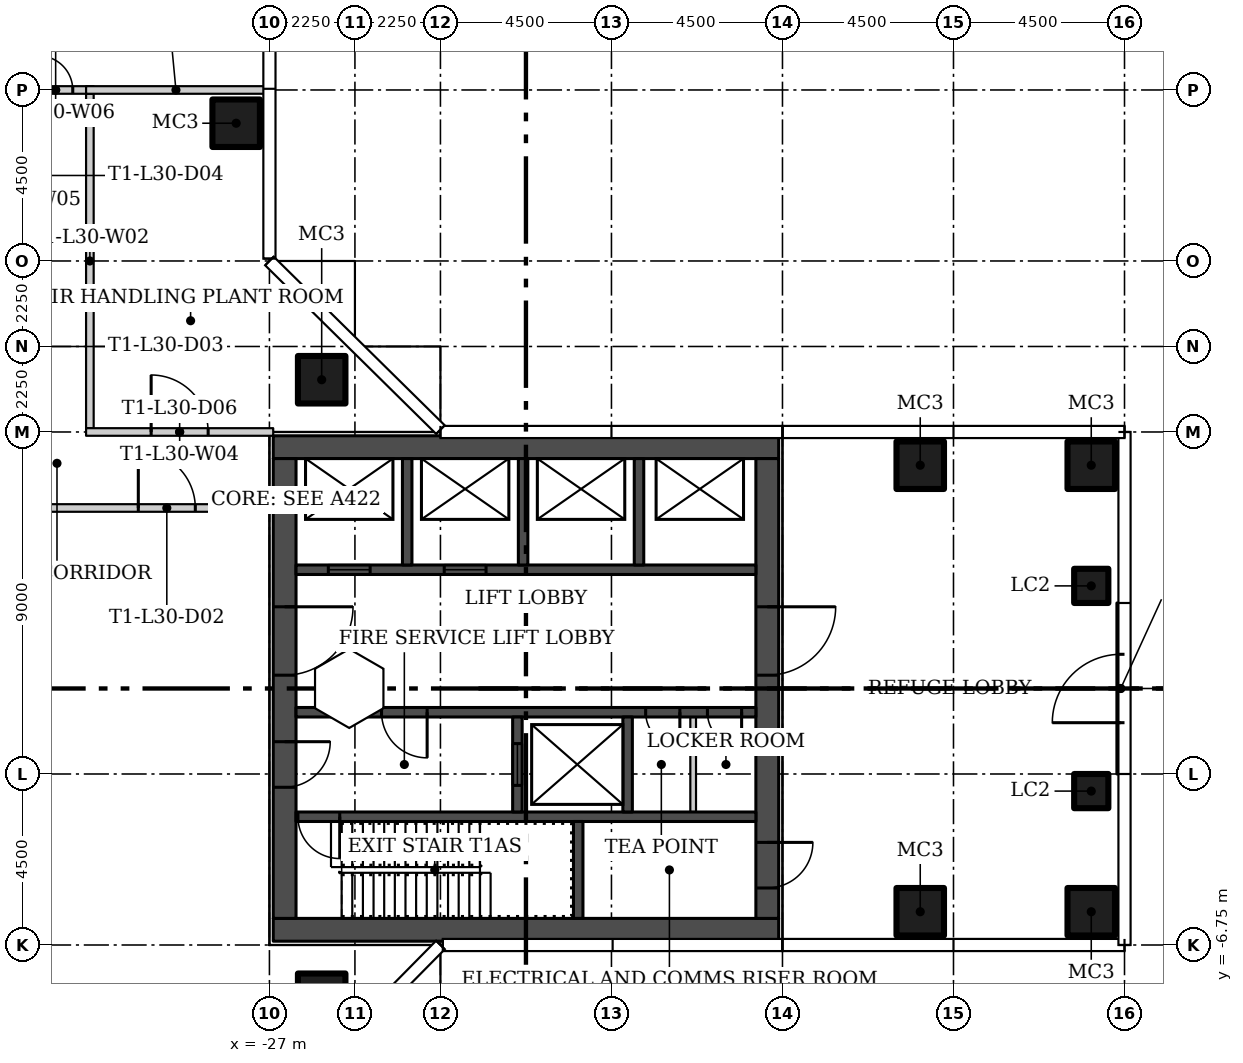
"""IFC4 building model, lengths in metres.
Left out: names, types, materials, properties, quantities, classifications, styles, units other than length and angle.
Written with IfcOpenShell. Run it as: python <this file> out.ifc"""

import sys

from ifc_helpers import new_model, si_unit, direction, frame, frame_2d, origin, origin_2d, place, context, subcontext, project, spatial, rectangle, hollow_rectangle, extrude, element, fill, save


model = new_model("IFC4")
c1 = context("Model", 3, precision=1e-05, world=origin(), true_north=direction((0.0, 1.0)))
c2 = subcontext(c1, "Body", "Model", "MODEL_VIEW")
j1 = project(units=[si_unit("LENGTHUNIT", "METRE"), si_unit("PLANEANGLEUNIT", "RADIAN")], contexts=[c1])
p1 = place(None, origin())
s1 = spatial("IfcSite", under=j1, at=p1, CompositionType="ELEMENT")
p2 = place(p1, origin())
s2 = spatial("IfcBuilding", under=s1, at=p2, CompositionType="ELEMENT")
p3 = place(p2, frame((0.0, 0.0, 128.7)))
s3 = spatial("IfcBuildingStorey", under=s2, at=p3, CompositionType="ELEMENT", Elevation=128.7)
for number, where in (
    (1, (-25.625, 8.125, 0.0)),
    (2, (-25.625, -8.125, 0.0)),
    (3, (-9.875, -5.875, 0.0)),
    (4, (-5.375, -5.875, 0.0)),
    (5, (-9.875, 5.875, 0.0)),
    (6, (-5.375, 5.875, 0.0)),
    (7, (-27.875, 14.875, 0.0)),
):
    element("IfcColumn", number, at=place(p3, frame(where)), inside=s3, PredefinedType="COLUMN", context=c2, shape_type="SweptSolid", body=[
        extrude(hollow_rectangle(XDim=1.25, YDim=1.25, WallThickness=0.05, at=origin_2d()), origin(), (0.0, 0.0, 1.0), 4.4),
    ])
for number, where in (
    (8, (-5.375, -2.7, 0.0)),
    (9, (-5.375, 2.7, 0.0)),
):
    element("IfcColumn", number, at=place(p3, frame(where)), inside=s3, PredefinedType="COLUMN", context=c2, shape_type="SweptSolid", body=[
        extrude(hollow_rectangle(XDim=0.9, YDim=0.9, WallThickness=0.036, at=origin_2d()), origin(), (0.0, 0.0, 1.0), 4.4),
    ])
p4 = place(p3, frame((-40.6, 4.75, 0.0)))
e10 = element("IfcWall", 10, at=p4, inside=s3, PredefinedType="PARTITIONING", context=c2, shape_type="SweptSolid", body=[
    extrude(rectangle(XDim=13.7, YDim=0.2, at=frame_2d((6.85, 0.0))), origin(), (0.0, 0.0, 1.0), 4.4),
])
p5 = place(p4, frame((2.05, 0.0, 0.0)))
e11 = element("IfcOpeningElement", 11, at=p5, cuts=e10, PredefinedType="OPENING", context=c2, shape_type="SweptSolid", body=[
    extrude(rectangle(XDim=1.5, YDim=2.4, at=frame_2d((0.75, 1.2))), frame((0.0, 0.11, 0.0), z_axis=(0.0, -1.0, 0.0), x_axis=(1.0, 0.0, 0.0)), (0.0, 0.0, 1.0), 0.22),
])
p6 = place(p4, frame((10.15, 0.0, 0.0)))
e12 = element("IfcOpeningElement", 12, at=p6, cuts=e10, PredefinedType="OPENING", context=c2, shape_type="SweptSolid", body=[
    extrude(rectangle(XDim=1.5, YDim=2.4, at=frame_2d((0.75, 1.2))), frame((0.0, 0.11, 0.0), z_axis=(0.0, -1.0, 0.0), x_axis=(1.0, 0.0, 0.0)), (0.0, 0.0, 1.0), 0.22),
])
p7 = place(p3, frame((-31.725, 15.65, 0.0), z_axis=(0.0, 0.0, 1.0), x_axis=(0.0, -1.0, 0.0)))
e13 = element("IfcWall", 13, at=p7, inside=s3, PredefinedType="PARTITIONING", context=c2, shape_type="SweptSolid", body=[
    extrude(rectangle(XDim=8.8, YDim=0.2, at=frame_2d((4.4, 0.0))), origin(), (0.0, 0.0, 1.0), 4.4),
])
p8 = place(p3, frame((-31.825, 6.75, 0.0)))
e14 = element("IfcWall", 14, at=p8, inside=s3, PredefinedType="PARTITIONING", context=c2, shape_type="SweptSolid", body=[
    extrude(rectangle(XDim=4.925, YDim=0.2, at=frame_2d((2.462, 0.0))), origin(), (0.0, 0.0, 1.0), 4.4),
])
p9 = place(p8, frame((1.712, 0.0, 0.0)))
e15 = element("IfcOpeningElement", 15, at=p9, cuts=e14, PredefinedType="OPENING", context=c2, shape_type="SweptSolid", body=[
    extrude(rectangle(XDim=1.5, YDim=2.4, at=frame_2d((0.75, 1.2))), frame((0.0, 0.11, 0.0), z_axis=(0.0, -1.0, 0.0), x_axis=(1.0, 0.0, 0.0)), (0.0, 0.0, 1.0), 0.22),
])
p10 = place(p3, frame((-33.625, 15.75, 0.0)))
e16 = element("IfcWall", 16, at=p10, inside=s3, PredefinedType="PARTITIONING", context=c2, shape_type="SweptSolid", body=[
    extrude(rectangle(XDim=2.001, YDim=0.2, at=frame_2d((1.0, 0.0))), origin(), (0.0, 0.0, 1.0), 4.4),
])
p11 = place(p10, frame((0.55, 0.0, 0.0)))
e17 = element("IfcOpeningElement", 17, at=p11, cuts=e16, PredefinedType="OPENING", context=c2, shape_type="SweptSolid", body=[
    extrude(rectangle(XDim=0.9, YDim=2.4, at=frame_2d((0.45, 1.2))), frame((0.0, 0.11, 0.0), z_axis=(0.0, -1.0, 0.0), x_axis=(1.0, 0.0, 0.0)), (0.0, 0.0, 1.0), 0.22),
])
p12 = place(p3, frame((-27.095, 15.75, 0.0), z_axis=(0.0, 0.0, 1.0), x_axis=(-1.0, 0.0, 0.0)))
e18 = element("IfcWall", 18, at=p12, inside=s3, PredefinedType="PARTITIONING", context=c2, shape_type="SweptSolid", body=[
    extrude(rectangle(XDim=4.73, YDim=0.2, at=frame_2d((2.365, 0.0))), origin(), (0.0, 0.0, 1.0), 4.4),
])
p13 = place(p3, frame((-4.6, -2.25, 0.0), z_axis=(0.0, 0.0, 1.0), x_axis=(0.0, 1.0, 0.0)))
e19 = element("IfcWall", 19, at=p13, inside=s3, PredefinedType="PARTITIONING", context=c2, shape_type="SweptSolid", body=[
    extrude(rectangle(XDim=4.5, YDim=0.2, at=frame_2d((2.25, 0.0))), origin(), (0.0, 0.0, 1.0), 4.4),
])
p14 = place(p13, frame((1.35, 0.0, 0.0)))
e20 = element("IfcOpeningElement", 20, at=p14, cuts=e19, PredefinedType="OPENING", context=c2, shape_type="SweptSolid", body=[
    extrude(rectangle(XDim=1.8, YDim=2.1, at=frame_2d((0.9, 1.05))), frame((0.0, 0.11, 0.0), z_axis=(0.0, -1.0, 0.0), x_axis=(1.0, 0.0, 0.0)), (0.0, 0.0, 1.0), 0.22),
])
for number, where in (
    (21, (-26.9, -6.35, 0.0)),
    (22, (-26.9, 6.35, 0.0)),
):
    element("IfcWall", number, at=place(p3, frame(where)), inside=s3, PredefinedType="SHEAR", context=c2, shape_type="SweptSolid", body=[
        extrude(rectangle(XDim=13.3, YDim=0.6, at=frame_2d((6.65, 0.0))), origin(), (0.0, 0.0, 1.0), 4.4),
    ])
p15 = place(p3, frame((-26.6, 6.05, 0.0), z_axis=(0.0, 0.0, 1.0), x_axis=(0.0, -1.0, 0.0)))
e23 = element("IfcWall", 23, at=p15, inside=s3, PredefinedType="SHEAR", context=c2, shape_type="SweptSolid", body=[
    extrude(rectangle(XDim=12.1, YDim=0.6, at=frame_2d((6.05, 0.0))), origin(), (0.0, 0.0, 1.0), 4.4),
])
p16 = place(p15, frame((7.45, 0.0, 0.0)))
e24 = element("IfcOpeningElement", 24, at=p16, cuts=e23, PredefinedType="OPENING", context=c2, shape_type="SweptSolid", body=[
    extrude(rectangle(XDim=1.2, YDim=2.1, at=frame_2d((0.6, 1.05))), frame((0.0, 0.31, 0.0), z_axis=(0.0, -1.0, 0.0), x_axis=(1.0, 0.0, 0.0)), (0.0, 0.0, 1.0), 0.62),
])
p17 = place(p15, frame((3.9, 0.0, 0.0)))
e25 = element("IfcOpeningElement", 25, at=p17, cuts=e23, PredefinedType="OPENING", context=c2, shape_type="SweptSolid", body=[
    extrude(rectangle(XDim=1.8, YDim=2.4, at=frame_2d((0.9, 1.2))), frame((0.0, 0.31, 0.0), z_axis=(0.0, -1.0, 0.0), x_axis=(1.0, 0.0, 0.0)), (0.0, 0.0, 1.0), 0.62),
])
p18 = place(p3, frame((-13.9, 6.05, 0.0), z_axis=(0.0, 0.0, 1.0), x_axis=(0.0, -1.0, 0.0)))
e26 = element("IfcWall", 26, at=p18, inside=s3, PredefinedType="SHEAR", context=c2, shape_type="SweptSolid", body=[
    extrude(rectangle(XDim=12.1, YDim=0.6, at=frame_2d((6.05, 0.0))), origin(), (0.0, 0.0, 1.0), 4.4),
])
p19 = place(p18, frame((10.1, 0.0, 0.0)))
e27 = element("IfcOpeningElement", 27, at=p19, cuts=e26, PredefinedType="OPENING", context=c2, shape_type="SweptSolid", body=[
    extrude(rectangle(XDim=1.2, YDim=2.1, at=frame_2d((0.6, 1.05))), frame((0.0, 0.31, 0.0), z_axis=(0.0, -1.0, 0.0), x_axis=(1.0, 0.0, 0.0)), (0.0, 0.0, 1.0), 0.62),
])
p20 = place(p18, frame((3.9, 0.0, 0.0)))
e28 = element("IfcOpeningElement", 28, at=p20, cuts=e26, PredefinedType="OPENING", context=c2, shape_type="SweptSolid", body=[
    extrude(rectangle(XDim=1.8, YDim=2.4, at=frame_2d((0.9, 1.2))), frame((0.0, 0.31, 0.0), z_axis=(0.0, -1.0, 0.0), x_axis=(1.0, 0.0, 0.0)), (0.0, 0.0, 1.0), 0.62),
])
p21 = place(p3, frame((-14.2, -3.375, 0.0), z_axis=(0.0, 0.0, 1.0), x_axis=(-1.0, 0.0, 0.0)))
e29 = element("IfcWall", 29, at=p21, inside=s3, PredefinedType="SHEAR", context=c2, shape_type="SweptSolid", body=[
    extrude(rectangle(XDim=12.1, YDim=0.25, at=frame_2d((6.05, 0.0))), origin(), (0.0, 0.0, 1.0), 4.4),
])
p22 = place(p21, frame((10.95, 0.0, 0.0)))
e30 = element("IfcOpeningElement", 30, at=p22, cuts=e29, PredefinedType="OPENING", context=c2, shape_type="SweptSolid", body=[
    extrude(rectangle(XDim=1.1, YDim=2.1, at=frame_2d((0.55, 1.05))), frame((0.0, 0.135, 0.0), z_axis=(0.0, -1.0, 0.0), x_axis=(1.0, 0.0, 0.0)), (0.0, 0.0, 1.0), 0.27),
])
p23 = place(p3, frame((-18.875, -6.05, 0.0), z_axis=(0.0, 0.0, 1.0), x_axis=(0.0, 1.0, 0.0)))
e31 = element("IfcWall", 31, at=p23, inside=s3, PredefinedType="SHEAR", context=c2, shape_type="SweptSolid", body=[
    extrude(rectangle(XDim=2.55, YDim=0.25, at=frame_2d((1.275, 0.0))), origin(), (0.0, 0.0, 1.0), 4.4),
])
p24 = place(p3, frame((-14.2, -0.625, 0.0), z_axis=(0.0, 0.0, 1.0), x_axis=(-1.0, 0.0, 0.0)))
e32 = element("IfcWall", 32, at=p24, inside=s3, PredefinedType="SHEAR", context=c2, shape_type="SweptSolid", body=[
    extrude(rectangle(XDim=12.1, YDim=0.25, at=frame_2d((6.05, 0.0))), origin(), (0.0, 0.0, 1.0), 4.4),
])
p25 = place(p24, frame((8.65, 0.0, 0.0)))
e33 = element("IfcOpeningElement", 33, at=p25, cuts=e32, PredefinedType="OPENING", context=c2, shape_type="SweptSolid", body=[
    extrude(rectangle(XDim=1.2, YDim=2.1, at=frame_2d((0.6, 1.05))), frame((0.0, 0.135, 0.0), z_axis=(0.0, -1.0, 0.0), x_axis=(1.0, 0.0, 0.0)), (0.0, 0.0, 1.0), 0.27),
])
p26 = place(p24, frame((2.0, 0.0, 0.0)))
e34 = element("IfcOpeningElement", 34, at=p26, cuts=e32, PredefinedType="OPENING", context=c2, shape_type="SweptSolid", body=[
    extrude(rectangle(XDim=0.9, YDim=2.1, at=frame_2d((0.45, 1.05))), frame((0.0, 0.135, 0.0), z_axis=(0.0, -1.0, 0.0), x_axis=(1.0, 0.0, 0.0)), (0.0, 0.0, 1.0), 0.27),
])
p27 = place(p24, frame((0.375, 0.0, 0.0)))
e35 = element("IfcOpeningElement", 35, at=p27, cuts=e32, PredefinedType="OPENING", context=c2, shape_type="SweptSolid", body=[
    extrude(rectangle(XDim=0.9, YDim=2.1, at=frame_2d((0.45, 1.05))), frame((0.0, 0.135, 0.0), z_axis=(0.0, -1.0, 0.0), x_axis=(1.0, 0.0, 0.0)), (0.0, 0.0, 1.0), 0.27),
])
p28 = place(p3, frame((-20.475, -3.25, 0.0), z_axis=(0.0, 0.0, 1.0), x_axis=(0.0, 1.0, 0.0)))
e36 = element("IfcWall", 36, at=p28, inside=s3, PredefinedType="SHEAR", context=c2, shape_type="SweptSolid", body=[
    extrude(rectangle(XDim=2.5, YDim=0.25, at=frame_2d((1.25, 0.0))), origin(), (0.0, 0.0, 1.0), 4.4),
])
p29 = place(p28, frame((0.7, 0.0, 0.0)))
e37 = element("IfcOpeningElement", 37, at=p29, cuts=e36, PredefinedType="OPENING", context=c2, shape_type="SweptSolid", body=[
    extrude(rectangle(XDim=1.1, YDim=2.1, at=frame_2d((0.55, 1.05))), frame((0.0, 0.135, 0.0), z_axis=(0.0, -1.0, 0.0), x_axis=(1.0, 0.0, 0.0)), (0.0, 0.0, 1.0), 0.27),
])
p30 = place(p3, frame((-17.575, -3.25, 0.0), z_axis=(0.0, 0.0, 1.0), x_axis=(0.0, 1.0, 0.0)))
e38 = element("IfcWall", 38, at=p30, inside=s3, PredefinedType="SHEAR", context=c2, shape_type="SweptSolid", body=[
    extrude(rectangle(XDim=2.5, YDim=0.25, at=frame_2d((1.25, 0.0))), origin(), (0.0, 0.0, 1.0), 4.4),
])
p31 = place(p3, frame((-15.85, -3.25, 0.0), z_axis=(0.0, 0.0, 1.0), x_axis=(0.0, 1.0, 0.0)))
e39 = element("IfcWall", 39, at=p31, inside=s3, PredefinedType="PARTITIONING", context=c2, shape_type="SweptSolid", body=[
    extrude(rectangle(XDim=2.5, YDim=0.15, at=frame_2d((1.25, 0.0))), origin(), (0.0, 0.0, 1.0), 4.4),
])
p32 = place(p3, frame((-26.3, 3.125, 0.0)))
e40 = element("IfcWall", 40, at=p32, inside=s3, PredefinedType="SHEAR", context=c2, shape_type="SweptSolid", body=[
    extrude(rectangle(XDim=12.1, YDim=0.25, at=frame_2d((6.05, 0.0))), origin(), (0.0, 0.0, 1.0), 4.4),
])
p33 = place(p32, frame((0.85, 0.0, 0.0)))
e41 = element("IfcOpeningElement", 41, at=p33, cuts=e40, PredefinedType="OPENING", context=c2, shape_type="SweptSolid", body=[
    extrude(rectangle(XDim=1.1, YDim=2.1, at=frame_2d((0.55, 1.05))), frame((0.0, 0.135, 0.0), z_axis=(0.0, -1.0, 0.0), x_axis=(1.0, 0.0, 0.0)), (0.0, 0.0, 1.0), 0.27),
])
p34 = place(p32, frame((3.9, 0.0, 0.0)))
e42 = element("IfcOpeningElement", 42, at=p34, cuts=e40, PredefinedType="OPENING", context=c2, shape_type="SweptSolid", body=[
    extrude(rectangle(XDim=1.1, YDim=2.1, at=frame_2d((0.55, 1.05))), frame((0.0, 0.135, 0.0), z_axis=(0.0, -1.0, 0.0), x_axis=(1.0, 0.0, 0.0)), (0.0, 0.0, 1.0), 0.27),
])
for number, where, z_axis, x_axis in (
    (43, (-23.375, 3.25, 0.0), (0.0, 0.0, 1.0), (0.0, 1.0, 0.0)),
    (44, (-20.325, 3.25, 0.0), (0.0, 0.0, 1.0), (0.0, 1.0, 0.0)),
    (45, (-17.275, 3.25, 0.0), (0.0, 0.0, 1.0), (0.0, 1.0, 0.0)),
):
    element("IfcWall", number, at=place(p3, frame(where, z_axis=z_axis, x_axis=x_axis)), inside=s3, PredefinedType="SHEAR", context=c2, shape_type="SweptSolid", body=[
        extrude(rectangle(XDim=2.8, YDim=0.25, at=frame_2d((1.4, 0.0))), origin(), (0.0, 0.0, 1.0), 4.4),
    ])
p35 = place(p6, origin())
e46 = element("IfcDoor", 46, at=p35, inside=s3, OperationType="DOUBLE_DOOR_SINGLE_SWING", PredefinedType="DOOR", context=c2, shape_type="SweptSolid", body=[
    extrude(rectangle(XDim=1.5, YDim=2.4, at=frame_2d((0.75, 1.2))), frame((0.0, 0.025, 0.0), z_axis=(0.0, -1.0, 0.0), x_axis=(1.0, 0.0, 0.0)), (0.0, 0.0, 1.0), 0.05),
])
fill(e12, e46)
p36 = place(p11, origin())
e47 = element("IfcDoor", 47, at=p36, inside=s3, OperationType="SINGLE_SWING_RIGHT", PredefinedType="DOOR", context=c2, shape_type="SweptSolid", body=[
    extrude(rectangle(XDim=0.9, YDim=2.4, at=frame_2d((0.45, 1.2))), frame((0.0, 0.025, 0.0), z_axis=(0.0, -1.0, 0.0), x_axis=(1.0, 0.0, 0.0)), (0.0, 0.0, 1.0), 0.05),
])
fill(e17, e47)
p37 = place(p9, origin())
e48 = element("IfcDoor", 48, at=p37, inside=s3, OperationType="DOUBLE_DOOR_SINGLE_SWING", PredefinedType="DOOR", context=c2, shape_type="SweptSolid", body=[
    extrude(rectangle(XDim=1.5, YDim=2.4, at=frame_2d((0.75, 1.2))), frame((0.0, 0.025, 0.0), z_axis=(0.0, -1.0, 0.0), x_axis=(1.0, 0.0, 0.0)), (0.0, 0.0, 1.0), 0.05),
])
fill(e15, e48)
p38 = place(p14, origin())
e49 = element("IfcDoor", 49, at=p38, inside=s3, OperationType="DOUBLE_DOOR_SINGLE_SWING", PredefinedType="DOOR", context=c2, shape_type="SweptSolid", body=[
    extrude(rectangle(XDim=1.8, YDim=2.1, at=frame_2d((0.9, 1.05))), frame((0.0, 0.025, 0.0), z_axis=(0.0, -1.0, 0.0), x_axis=(1.0, 0.0, 0.0)), (0.0, 0.0, 1.0), 0.05),
])
fill(e20, e49)
p39 = place(p16, origin())
e50 = element("IfcDoor", 50, at=p39, inside=s3, OperationType="SINGLE_SWING_RIGHT", PredefinedType="DOOR", context=c2, shape_type="SweptSolid", body=[
    extrude(rectangle(XDim=1.2, YDim=2.1, at=frame_2d((0.6, 1.05))), frame((0.0, 0.025, 0.0), z_axis=(0.0, -1.0, 0.0), x_axis=(1.0, 0.0, 0.0)), (0.0, 0.0, 1.0), 0.05),
])
fill(e24, e50)
p40 = place(p17, origin())
e51 = element("IfcDoor", 51, at=p40, inside=s3, OperationType="DOUBLE_DOOR_SINGLE_SWING", PredefinedType="DOOR", context=c2, shape_type="SweptSolid", body=[
    extrude(rectangle(XDim=1.8, YDim=2.4, at=frame_2d((0.9, 1.2))), frame((0.0, 0.025, 0.0), z_axis=(0.0, -1.0, 0.0), x_axis=(1.0, 0.0, 0.0)), (0.0, 0.0, 1.0), 0.05),
])
fill(e25, e51)
p41 = place(p19, origin())
e52 = element("IfcDoor", 52, at=p41, inside=s3, OperationType="SINGLE_SWING_RIGHT", PredefinedType="DOOR", context=c2, shape_type="SweptSolid", body=[
    extrude(rectangle(XDim=1.2, YDim=2.1, at=frame_2d((0.6, 1.05))), frame((0.0, 0.025, 0.0), z_axis=(0.0, -1.0, 0.0), x_axis=(1.0, 0.0, 0.0)), (0.0, 0.0, 1.0), 0.05),
])
fill(e27, e52)
p42 = place(p20, origin())
e53 = element("IfcDoor", 53, at=p42, inside=s3, OperationType="DOUBLE_DOOR_SINGLE_SWING", PredefinedType="DOOR", context=c2, shape_type="SweptSolid", body=[
    extrude(rectangle(XDim=1.8, YDim=2.4, at=frame_2d((0.9, 1.2))), frame((0.0, 0.025, 0.0), z_axis=(0.0, -1.0, 0.0), x_axis=(1.0, 0.0, 0.0)), (0.0, 0.0, 1.0), 0.05),
])
fill(e28, e53)
p43 = place(p22, origin())
e54 = element("IfcDoor", 54, at=p43, inside=s3, OperationType="SINGLE_SWING_RIGHT", PredefinedType="DOOR", context=c2, shape_type="SweptSolid", body=[
    extrude(rectangle(XDim=1.1, YDim=2.1, at=frame_2d((0.55, 1.05))), frame((0.0, 0.025, 0.0), z_axis=(0.0, -1.0, 0.0), x_axis=(1.0, 0.0, 0.0)), (0.0, 0.0, 1.0), 0.05),
])
fill(e30, e54)
p44 = place(p25, origin())
e55 = element("IfcDoor", 55, at=p44, inside=s3, OperationType="SINGLE_SWING_RIGHT", PredefinedType="DOOR", context=c2, shape_type="SweptSolid", body=[
    extrude(rectangle(XDim=1.2, YDim=2.1, at=frame_2d((0.6, 1.05))), frame((0.0, 0.025, 0.0), z_axis=(0.0, -1.0, 0.0), x_axis=(1.0, 0.0, 0.0)), (0.0, 0.0, 1.0), 0.05),
])
fill(e33, e55)
p45 = place(p26, origin())
e56 = element("IfcDoor", 56, at=p45, inside=s3, OperationType="SINGLE_SWING_LEFT", PredefinedType="DOOR", context=c2, shape_type="SweptSolid", body=[
    extrude(rectangle(XDim=0.9, YDim=2.1, at=frame_2d((0.45, 1.05))), frame((0.0, 0.025, 0.0), z_axis=(0.0, -1.0, 0.0), x_axis=(1.0, 0.0, 0.0)), (0.0, 0.0, 1.0), 0.05),
])
fill(e34, e56)
p46 = place(p27, origin())
e57 = element("IfcDoor", 57, at=p46, inside=s3, OperationType="SINGLE_SWING_LEFT", PredefinedType="DOOR", context=c2, shape_type="SweptSolid", body=[
    extrude(rectangle(XDim=0.9, YDim=2.1, at=frame_2d((0.45, 1.05))), frame((0.0, 0.025, 0.0), z_axis=(0.0, -1.0, 0.0), x_axis=(1.0, 0.0, 0.0)), (0.0, 0.0, 1.0), 0.05),
])
fill(e35, e57)
p47 = place(p29, origin())
e58 = element("IfcDoor", 58, at=p47, inside=s3, OperationType="SLIDING_TO_LEFT", PredefinedType="DOOR", context=c2, shape_type="SweptSolid", body=[
    extrude(rectangle(XDim=1.1, YDim=2.1, at=frame_2d((0.55, 1.05))), frame((0.0, 0.025, 0.0), z_axis=(0.0, -1.0, 0.0), x_axis=(1.0, 0.0, 0.0)), (0.0, 0.0, 1.0), 0.05),
])
fill(e37, e58)
p48 = place(p33, origin())
e59 = element("IfcDoor", 59, at=p48, inside=s3, OperationType="SLIDING_TO_LEFT", PredefinedType="DOOR", context=c2, shape_type="SweptSolid", body=[
    extrude(rectangle(XDim=1.1, YDim=2.1, at=frame_2d((0.55, 1.05))), frame((0.0, 0.025, 0.0), z_axis=(0.0, -1.0, 0.0), x_axis=(1.0, 0.0, 0.0)), (0.0, 0.0, 1.0), 0.05),
])
fill(e41, e59)
p49 = place(p34, origin())
e60 = element("IfcDoor", 60, at=p49, inside=s3, OperationType="SLIDING_TO_LEFT", PredefinedType="DOOR", context=c2, shape_type="SweptSolid", body=[
    extrude(rectangle(XDim=1.1, YDim=2.1, at=frame_2d((0.55, 1.05))), frame((0.0, 0.025, 0.0), z_axis=(0.0, -1.0, 0.0), x_axis=(1.0, 0.0, 0.0)), (0.0, 0.0, 1.0), 0.05),
])
fill(e42, e60)
save(model, sys.argv[1])
